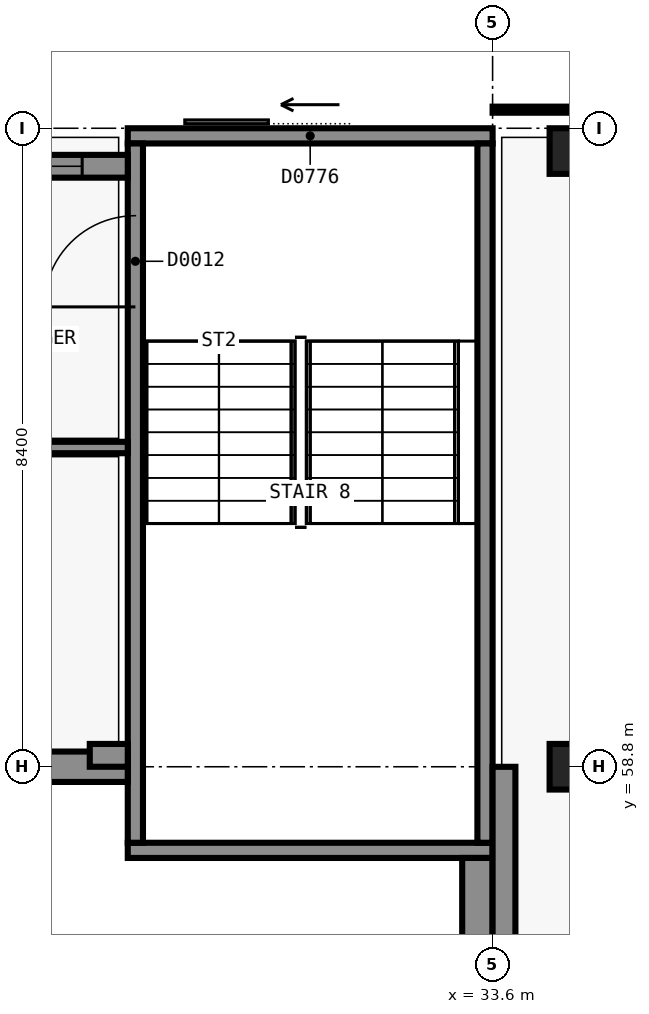
"""IFC4 building model, lengths in metres.
Left out: names, types, materials, properties, quantities, classifications, styles, units other than length and angle.
Written with IfcOpenShell. Run it as: python <this file> out.ifc"""

import sys

from ifc_helpers import new_model, si_unit, direction, frame, frame_2d, origin, origin_2d, place, context, subcontext, project, spatial, rectangle, extrude, element, fill, save


model = new_model("IFC4")
c1 = context("Model", 3, precision=1e-05, world=origin(), true_north=direction((0.0, 1.0)))
c2 = subcontext(c1, "Body", "Model", "MODEL_VIEW")
j1 = project(units=[si_unit("LENGTHUNIT", "METRE"), si_unit("PLANEANGLEUNIT", "RADIAN")], contexts=[c1])
p1 = place(None, origin())
s1 = spatial("IfcSite", under=j1, at=p1, CompositionType="ELEMENT")
p2 = place(p1, origin())
s2 = spatial("IfcBuilding", under=s1, at=p2, CompositionType="ELEMENT")
p3 = place(p2, origin())
s3 = spatial("IfcBuildingStorey", under=s2, at=p3, CompositionType="ELEMENT", Elevation=0.0)
p4 = place(p3, frame((33.6, 57.7, -0.3), z_axis=(0.0, 0.0, 1.0), x_axis=(-1.0, 0.0, 0.0)))
e1 = element("IfcWall", 1, at=p4, inside=s3, PredefinedType="SHEAR", context=c2, shape_type="SweptSolid", body=[
    extrude(rectangle(XDim=4.8, YDim=0.2, at=frame_2d((2.4, 0.0))), origin(), (0.0, 0.0, 1.0), 5.7),
])
p5 = place(p3, frame((28.8, 67.1, -0.3), z_axis=(0.0, 0.0, 1.0), x_axis=(1.0, 0.0, 0.0)))
e2 = element("IfcWall", 2, at=p5, inside=s3, PredefinedType="SHEAR", context=c2, shape_type="SweptSolid", body=[
    extrude(rectangle(XDim=4.8, YDim=0.2, at=frame_2d((2.4, 0.0))), origin(), (0.0, 0.0, 1.0), 5.7),
])
p6 = place(p5, frame((1.85, 0.0, 0.0)))
e3 = element("IfcOpeningElement", 3, at=p6, cuts=e2, PredefinedType="OPENING", context=c2, shape_type="SweptSolid", body=[
    extrude(rectangle(XDim=1.1, YDim=2.2, at=frame_2d((0.55, 1.1))), frame((0.0, 0.11, 0.0), z_axis=(0.0, -1.0, 0.0), x_axis=(1.0, 0.0, 0.0)), (0.0, 0.0, 1.0), 0.22),
])
p7 = place(p3, frame((28.9, 57.8, -0.3), z_axis=(0.0, 0.0, 1.0), x_axis=(0.0, 1.0, 0.0)))
e4 = element("IfcWall", 4, at=p7, inside=s3, PredefinedType="SHEAR", context=c2, shape_type="SweptSolid", body=[
    extrude(rectangle(XDim=9.2, YDim=0.2, at=frame_2d((4.6, 0.0))), origin(), (0.0, 0.0, 1.0), 5.7),
])
p8 = place(p7, frame((7.05, 0.0, 0.3)))
e5 = element("IfcOpeningElement", 5, at=p8, cuts=e4, PredefinedType="OPENING", context=c2, shape_type="SweptSolid", body=[
    extrude(rectangle(XDim=1.2, YDim=2.1, at=frame_2d((0.6, 1.05))), frame((0.0, 0.11, 0.0), z_axis=(0.0, -1.0, 0.0), x_axis=(1.0, 0.0, 0.0)), (0.0, 0.0, 1.0), 0.22),
])
p9 = place(p3, frame((33.5, 67.0, -0.3), z_axis=(0.0, 0.0, 1.0), x_axis=(0.0, -1.0, 0.0)))
e6 = element("IfcWall", 6, at=p9, inside=s3, PredefinedType="SHEAR", context=c2, shape_type="SweptSolid", body=[
    extrude(rectangle(XDim=9.2, YDim=0.2, at=frame_2d((4.6, 0.0))), origin(), (0.0, 0.0, 1.0), 5.7),
])
p10 = place(p3, frame((17.0, 58.8, -0.3), z_axis=(0.0, 0.0, 1.0), x_axis=(1.0, 0.0, 0.0)))
e7 = element("IfcWall", 7, at=p10, inside=s3, PredefinedType="SHEAR", context=c2, shape_type="SweptSolid", body=[
    extrude(rectangle(XDim=11.8, YDim=0.4, at=frame_2d((5.9, 0.0))), origin(), (0.0, 0.0, 1.0), 5.7),
])
p11 = place(p10, frame((5.05, 0.0, 0.3)))
e8 = element("IfcOpeningElement", 8, at=p11, cuts=e7, PredefinedType="OPENING", context=c2, shape_type="SweptSolid", body=[
    extrude(rectangle(XDim=1.8, YDim=2.1, at=frame_2d((0.9, 1.05))), frame((0.0, 0.21, 0.0), z_axis=(0.0, -1.0, 0.0), x_axis=(1.0, 0.0, 0.0)), (0.0, 0.0, 1.0), 0.42),
])
p12 = place(p3, frame((33.4, 57.6, -0.3), z_axis=(0.0, 0.0, 1.0), x_axis=(0.0, -1.0, 0.0)))
e9 = element("IfcWall", 9, at=p12, inside=s3, PredefinedType="SHEAR", context=c2, shape_type="SweptSolid", body=[
    extrude(rectangle(XDim=15.4, YDim=0.4, at=frame_2d((7.7, 0.0))), origin(), (0.0, 0.0, 1.0), 5.7),
])
p13 = place(p12, frame((8.2, 0.0, 0.3)))
e10 = element("IfcOpeningElement", 10, at=p13, cuts=e9, PredefinedType="OPENING", context=c2, shape_type="SweptSolid", body=[
    extrude(rectangle(XDim=1.8, YDim=2.1, at=frame_2d((0.9, 1.05))), frame((0.0, 0.21, 0.0), z_axis=(0.0, -1.0, 0.0), x_axis=(1.0, 0.0, 0.0)), (0.0, 0.0, 1.0), 0.42),
])
for number, where, z_axis, x_axis in (
    (11, (34.65, 58.8, -0.3), (0.0, 0.0, 1.0), (1.0, 0.0, 0.0)),
    (12, (34.65, 66.9, -0.3), (0.0, 0.0, 1.0), (1.0, 0.0, 0.0)),
):
    element("IfcColumn", number, at=place(p3, frame(where, z_axis=z_axis, x_axis=x_axis)), inside=s3, PredefinedType="COLUMN", context=c2, shape_type="SweptSolid", body=[
        extrude(rectangle(XDim=0.6, YDim=0.6, at=origin_2d()), origin(), (0.0, 0.0, 1.0), 5.7),
    ])
p14 = place(p3, frame((28.8, 58.95, -1.2), z_axis=(0.0, 0.0, 1.0), x_axis=(-1.0, 0.0, 0.0)))
e13 = element("IfcWall", 13, at=p14, inside=s3, PredefinedType="SOLIDWALL", context=c2, shape_type="SweptSolid", body=[
    extrude(rectangle(XDim=0.5, YDim=0.3, at=frame_2d((0.25, 0.0))), origin(), (0.0, 0.0, 1.0), 0.9),
])
p15 = place(p3, frame((33.75, 52.3, -1.2), z_axis=(0.0, 0.0, 1.0), x_axis=(0.0, 1.0, 0.0)))
e14 = element("IfcWall", 14, at=p15, inside=s3, PredefinedType="SOLIDWALL", context=c2, shape_type="SweptSolid", body=[
    extrude(rectangle(XDim=6.499, YDim=0.3, at=frame_2d((3.25, 0.0))), origin(), (0.0, 0.0, 1.0), 0.9),
])
p16 = place(p3, frame((33.6, 67.445, 0.0), z_axis=(0.0, 0.0, 1.0), x_axis=(1.0, 0.0, 0.0)))
e15 = element("IfcWall", 15, at=p16, inside=s3, PredefinedType="MOVABLE", context=c2, shape_type="SweptSolid", body=[
    extrude(rectangle(XDim=25.2, YDim=0.08, at=frame_2d((12.6, 0.0))), origin(), (0.0, 0.0, 1.0), 3.0),
])
p17 = place(p16, frame((4.55, 0.0, 0.0)))
e16 = element("IfcOpeningElement", 16, at=p17, cuts=e15, PredefinedType="OPENING", context=c2, shape_type="SweptSolid", body=[
    extrude(rectangle(XDim=3.0, YDim=2.8, at=frame_2d((1.5, 1.4))), frame((0.0, 0.05, 0.0), z_axis=(0.0, -1.0, 0.0), x_axis=(1.0, 0.0, 0.0)), (0.0, 0.0, 1.0), 0.1),
])
p18 = place(p16, frame((8.85, 0.0, 0.0)))
e17 = element("IfcOpeningElement", 17, at=p18, cuts=e15, PredefinedType="OPENING", context=c2, shape_type="SweptSolid", body=[
    extrude(rectangle(XDim=3.0, YDim=2.8, at=frame_2d((1.5, 1.4))), frame((0.0, 0.05, 0.0), z_axis=(0.0, -1.0, 0.0), x_axis=(1.0, 0.0, 0.0)), (0.0, 0.0, 1.0), 0.1),
])
p19 = place(p16, frame((12.15, 0.0, 0.0)))
e18 = element("IfcOpeningElement", 18, at=p19, cuts=e15, PredefinedType="OPENING", context=c2, shape_type="SweptSolid", body=[
    extrude(rectangle(XDim=3.0, YDim=2.8, at=frame_2d((1.5, 1.4))), frame((0.0, 0.05, 0.0), z_axis=(0.0, -1.0, 0.0), x_axis=(1.0, 0.0, 0.0)), (0.0, 0.0, 1.0), 0.1),
])
p20 = place(p16, frame((17.25, 0.0, 0.0)))
e19 = element("IfcOpeningElement", 19, at=p20, cuts=e15, PredefinedType="OPENING", context=c2, shape_type="SweptSolid", body=[
    extrude(rectangle(XDim=3.0, YDim=2.8, at=frame_2d((1.5, 1.4))), frame((0.0, 0.05, 0.0), z_axis=(0.0, -1.0, 0.0), x_axis=(1.0, 0.0, 0.0)), (0.0, 0.0, 1.0), 0.1),
])
p21 = place(p16, frame((20.55, 0.0, 0.0)))
e20 = element("IfcOpeningElement", 20, at=p21, cuts=e15, PredefinedType="OPENING", context=c2, shape_type="SweptSolid", body=[
    extrude(rectangle(XDim=1.8, YDim=2.4, at=frame_2d((0.9, 1.2))), frame((0.0, 0.05, 0.0), z_axis=(0.0, -1.0, 0.0), x_axis=(1.0, 0.0, 0.0)), (0.0, 0.0, 1.0), 0.1),
])
p22 = place(p3, frame((4.8, 66.7, 0.0), z_axis=(0.0, 0.0, 1.0), x_axis=(1.0, 0.0, 0.0)))
e21 = element("IfcWall", 21, at=p22, inside=s3, PredefinedType="SOLIDWALL", context=c2, shape_type="SweptSolid", body=[
    extrude(rectangle(XDim=24.0, YDim=0.3, at=frame_2d((12.0, 0.0))), origin(), (0.0, 0.0, 1.0), 5.1),
])
p23 = place(p22, frame((6.0, 0.0, 0.0)))
e22 = element("IfcOpeningElement", 22, at=p23, cuts=e21, PredefinedType="OPENING", context=c2, shape_type="SweptSolid", body=[
    extrude(rectangle(XDim=3.6, YDim=2.4, at=frame_2d((1.8, 1.2))), frame((0.0, 0.16, 0.0), z_axis=(0.0, -1.0, 0.0), x_axis=(1.0, 0.0, 0.0)), (0.0, 0.0, 1.0), 0.32),
])
p24 = place(p22, frame((0.6, 0.0, 0.9)))
e23 = element("IfcOpeningElement", 23, at=p24, cuts=e21, PredefinedType="OPENING", context=c2, shape_type="SweptSolid", body=[
    extrude(rectangle(XDim=1.8, YDim=1.5, at=frame_2d((0.9, 0.75))), frame((0.0, 0.16, 0.0), z_axis=(0.0, -1.0, 0.0), x_axis=(1.0, 0.0, 0.0)), (0.0, 0.0, 1.0), 0.32),
])
p25 = place(p22, frame((21.6, 0.0, 0.9)))
e24 = element("IfcOpeningElement", 24, at=p25, cuts=e21, PredefinedType="OPENING", context=c2, shape_type="SweptSolid", body=[
    extrude(rectangle(XDim=1.8, YDim=1.5, at=frame_2d((0.9, 0.75))), frame((0.0, 0.16, 0.0), z_axis=(0.0, -1.0, 0.0), x_axis=(1.0, 0.0, 0.0)), (0.0, 0.0, 1.0), 0.32),
])
p26 = place(p3, frame((25.3, 63.0, 0.0), z_axis=(0.0, 0.0, 1.0), x_axis=(1.0, 0.0, 0.0)))
e25 = element("IfcWall", 25, at=p26, inside=s3, PredefinedType="PARTITIONING", context=c2, shape_type="SweptSolid", body=[
    extrude(rectangle(XDim=3.5, YDim=0.15, at=frame_2d((1.75, 0.0))), origin(), (0.0, 0.0, 1.0), 4.4),
])
p27 = place(p6, origin())
e26 = element("IfcDoor", 26, at=p27, inside=s3, OperationType="SLIDING_TO_LEFT", PredefinedType="DOOR", context=c2, shape_type="SweptSolid", body=[
    extrude(rectangle(XDim=1.1, YDim=2.2, at=frame_2d((0.55, 1.1))), frame((0.0, 0.025, 0.0), z_axis=(0.0, -1.0, 0.0), x_axis=(1.0, 0.0, 0.0)), (0.0, 0.0, 1.0), 0.05),
])
fill(e3, e26)
p28 = place(p25, origin())
e27 = element("IfcWindow", 27, at=p28, inside=s3, PartitioningType="SINGLE_PANEL", PredefinedType="WINDOW", context=c2, shape_type="SweptSolid", body=[
    extrude(rectangle(XDim=1.8, YDim=1.5, at=frame_2d((0.9, 0.75))), frame((0.0, 0.03, 0.0), z_axis=(0.0, -1.0, 0.0), x_axis=(1.0, 0.0, 0.0)), (0.0, 0.0, 1.0), 0.06),
])
fill(e24, e27)
p29 = place(p8, origin())
e28 = element("IfcDoor", 28, at=p29, inside=s3, OperationType="SINGLE_SWING_RIGHT", PredefinedType="DOOR", context=c2, shape_type="SweptSolid", body=[
    extrude(rectangle(XDim=1.2, YDim=2.1, at=frame_2d((0.6, 1.05))), frame((0.0, 0.025, 0.0), z_axis=(0.0, -1.0, 0.0), x_axis=(1.0, 0.0, 0.0)), (0.0, 0.0, 1.0), 0.05),
])
fill(e5, e28)
save(model, sys.argv[1])
